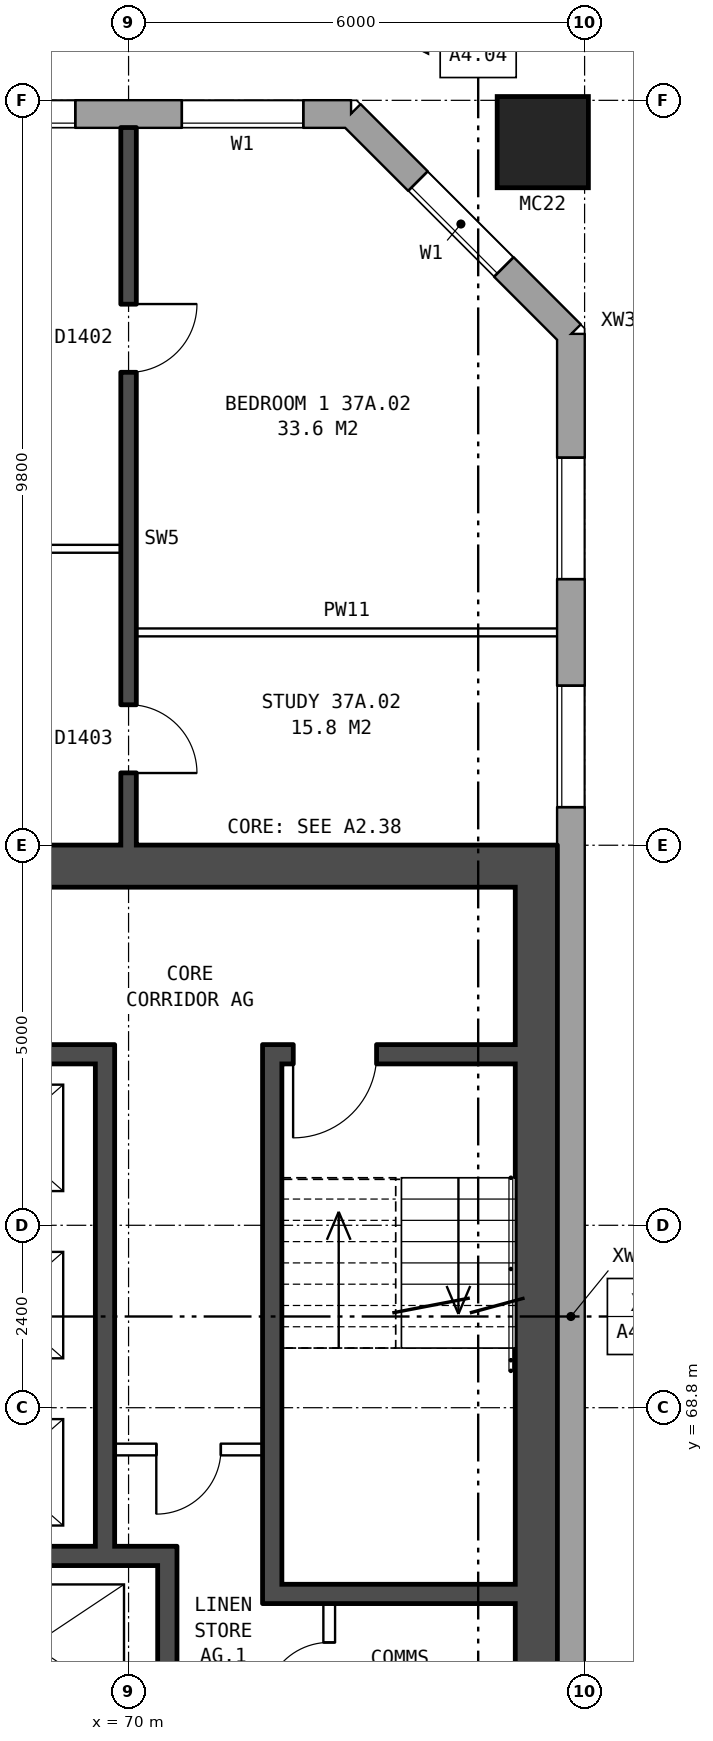
"""IFC4 building model, lengths in metres.
Left out: names, types, materials, properties, quantities, classifications, styles, units other than length and angle.
Written with IfcOpenShell. Run it as: python <this file> out.ifc"""

import sys

from ifc_helpers import new_model, si_unit, direction, frame, frame_2d, origin, origin_2d, place, context, subcontext, project, spatial, rectangle, hollow_rectangle, extrude, element, fill, save


model = new_model("IFC4")
c1 = context("Model", 3, precision=1e-05, world=origin(), true_north=direction((0.0, 1.0)))
c2 = subcontext(c1, "Body", "Model", "MODEL_VIEW")
j1 = project(units=[si_unit("LENGTHUNIT", "METRE"), si_unit("PLANEANGLEUNIT", "RADIAN")], contexts=[c1])
p1 = place(None, origin())
s1 = spatial("IfcSite", under=j1, at=p1, CompositionType="ELEMENT")
p2 = place(p1, origin())
s2 = spatial("IfcBuilding", under=s1, at=p2, CompositionType="ELEMENT")
p3 = place(p2, frame((0.0, 0.0, 133.0)))
s3 = spatial("IfcBuildingStorey", under=s2, at=p3, CompositionType="ELEMENT", Elevation=133.0)
p4 = place(p3, frame((75.45, 85.45, 0.0), z_axis=(0.0, 0.0, 1.0), x_axis=(1.0, 0.0, 0.0)))
e1 = element("IfcColumn", 1, at=p4, inside=s3, PredefinedType="COLUMN", context=c2, shape_type="SweptSolid", body=[
    extrude(hollow_rectangle(XDim=1.2, YDim=1.2, WallThickness=0.065, at=origin_2d()), origin(), (0.0, 0.0, 1.0), 3.1),
])
p5 = place(p3, frame((75.82, 57.075, 0.0), z_axis=(0.0, 0.0, 1.0), x_axis=(0.0, 1.0, 0.0)))
e2 = element("IfcWall", 2, at=p5, inside=s3, PredefinedType="STANDARD", context=c2, shape_type="SweptSolid", body=[
    extrude(rectangle(XDim=25.851, YDim=0.36, at=frame_2d((12.925, 0.0))), origin(), (0.0, 0.0, 1.0), 2.85),
])
p6 = place(p5, frame((1.625, 0.0, 0.8)))
e3 = element("IfcOpeningElement", 3, at=p6, cuts=e2, PredefinedType="OPENING", context=c2, shape_type="SweptSolid", body=[
    extrude(rectangle(XDim=1.6, YDim=1.8, at=frame_2d((0.8, 0.9))), frame((0.0, 0.19, 0.0), z_axis=(0.0, -1.0, 0.0), x_axis=(1.0, 0.0, 0.0)), (0.0, 0.0, 1.0), 0.38),
])
p7 = place(p5, frame((4.625, 0.0, 0.8)))
e4 = element("IfcOpeningElement", 4, at=p7, cuts=e2, PredefinedType="OPENING", context=c2, shape_type="SweptSolid", body=[
    extrude(rectangle(XDim=1.6, YDim=1.8, at=frame_2d((0.8, 0.9))), frame((0.0, 0.19, 0.0), z_axis=(0.0, -1.0, 0.0), x_axis=(1.0, 0.0, 0.0)), (0.0, 0.0, 1.0), 0.38),
])
p8 = place(p5, frame((19.625, 0.0, 0.8)))
e5 = element("IfcOpeningElement", 5, at=p8, cuts=e2, PredefinedType="OPENING", context=c2, shape_type="SweptSolid", body=[
    extrude(rectangle(XDim=1.6, YDim=1.8, at=frame_2d((0.8, 0.9))), frame((0.0, 0.19, 0.0), z_axis=(0.0, -1.0, 0.0), x_axis=(1.0, 0.0, 0.0)), (0.0, 0.0, 1.0), 0.38),
])
p9 = place(p5, frame((22.625, 0.0, 0.8)))
e6 = element("IfcOpeningElement", 6, at=p9, cuts=e2, PredefinedType="OPENING", context=c2, shape_type="SweptSolid", body=[
    extrude(rectangle(XDim=1.6, YDim=1.8, at=frame_2d((0.8, 0.9))), frame((0.0, 0.19, 0.0), z_axis=(0.0, -1.0, 0.0), x_axis=(1.0, 0.0, 0.0)), (0.0, 0.0, 1.0), 0.38),
])
p10 = place(p3, frame((75.82, 82.925, 0.0), z_axis=(0.0, 0.0, 1.0), x_axis=(-0.707106781187, 0.707106781187, 0.0)))
e7 = element("IfcWall", 7, at=p10, inside=s3, PredefinedType="STANDARD", context=c2, shape_type="SweptSolid", body=[
    extrude(rectangle(XDim=4.094, YDim=0.36, at=frame_2d((2.047, 0.0))), origin(), (0.0, 0.0, 1.0), 2.85),
])
p11 = place(p10, frame((1.247, 0.0, 0.8)))
e8 = element("IfcOpeningElement", 8, at=p11, cuts=e7, PredefinedType="OPENING", context=c2, shape_type="SweptSolid", body=[
    extrude(rectangle(XDim=1.6, YDim=1.8, at=frame_2d((0.8, 0.9))), frame((0.0, 0.19, 0.0), z_axis=(0.0, -1.0, 0.0), x_axis=(1.0, 0.0, 0.0)), (0.0, 0.0, 1.0), 0.38),
])
p12 = place(p3, frame((72.925, 85.82, 0.0), z_axis=(0.0, 0.0, 1.0), x_axis=(-1.0, 0.0, 0.0)))
e9 = element("IfcWall", 9, at=p12, inside=s3, PredefinedType="STANDARD", context=c2, shape_type="SweptSolid", body=[
    extrude(rectangle(XDim=43.101, YDim=0.36, at=frame_2d((21.55, 0.0))), origin(), (0.0, 0.0, 1.0), 2.85),
])
p13 = place(p12, frame((0.625, 0.0, 0.8)))
e10 = element("IfcOpeningElement", 10, at=p13, cuts=e9, PredefinedType="OPENING", context=c2, shape_type="SweptSolid", body=[
    extrude(rectangle(XDim=1.6, YDim=1.8, at=frame_2d((0.8, 0.9))), frame((0.0, 0.19, 0.0), z_axis=(0.0, -1.0, 0.0), x_axis=(1.0, 0.0, 0.0)), (0.0, 0.0, 1.0), 0.38),
])
p14 = place(p12, frame((3.625, 0.0, 0.8)))
e11 = element("IfcOpeningElement", 11, at=p14, cuts=e9, PredefinedType="OPENING", context=c2, shape_type="SweptSolid", body=[
    extrude(rectangle(XDim=1.6, YDim=1.8, at=frame_2d((0.8, 0.9))), frame((0.0, 0.19, 0.0), z_axis=(0.0, -1.0, 0.0), x_axis=(1.0, 0.0, 0.0)), (0.0, 0.0, 1.0), 0.38),
])
p15 = place(p12, frame((6.625, 0.0, 0.8)))
e12 = element("IfcOpeningElement", 12, at=p15, cuts=e9, PredefinedType="OPENING", context=c2, shape_type="SweptSolid", body=[
    extrude(rectangle(XDim=1.6, YDim=1.8, at=frame_2d((0.8, 0.9))), frame((0.0, 0.19, 0.0), z_axis=(0.0, -1.0, 0.0), x_axis=(1.0, 0.0, 0.0)), (0.0, 0.0, 1.0), 0.38),
])
p16 = place(p12, frame((9.625, 0.0, 0.8)))
e13 = element("IfcOpeningElement", 13, at=p16, cuts=e9, PredefinedType="OPENING", context=c2, shape_type="SweptSolid", body=[
    extrude(rectangle(XDim=1.6, YDim=1.8, at=frame_2d((0.8, 0.9))), frame((0.0, 0.19, 0.0), z_axis=(0.0, -1.0, 0.0), x_axis=(1.0, 0.0, 0.0)), (0.0, 0.0, 1.0), 0.38),
])
p17 = place(p12, frame((12.075, 0.0, 1.65)))
e14 = element("IfcOpeningElement", 14, at=p17, cuts=e9, PredefinedType="OPENING", context=c2, shape_type="SweptSolid", body=[
    extrude(rectangle(XDim=1.0, YDim=0.9, at=frame_2d((0.5, 0.45))), frame((0.0, 0.19, 0.0), z_axis=(0.0, -1.0, 0.0), x_axis=(1.0, 0.0, 0.0)), (0.0, 0.0, 1.0), 0.38),
])
p18 = place(p12, frame((15.625, 0.0, 0.8)))
e15 = element("IfcOpeningElement", 15, at=p18, cuts=e9, PredefinedType="OPENING", context=c2, shape_type="SweptSolid", body=[
    extrude(rectangle(XDim=1.6, YDim=1.8, at=frame_2d((0.8, 0.9))), frame((0.0, 0.19, 0.0), z_axis=(0.0, -1.0, 0.0), x_axis=(1.0, 0.0, 0.0)), (0.0, 0.0, 1.0), 0.38),
])
p19 = place(p12, frame((18.625, 0.0, 0.8)))
e16 = element("IfcOpeningElement", 16, at=p19, cuts=e9, PredefinedType="OPENING", context=c2, shape_type="SweptSolid", body=[
    extrude(rectangle(XDim=1.6, YDim=1.8, at=frame_2d((0.8, 0.9))), frame((0.0, 0.19, 0.0), z_axis=(0.0, -1.0, 0.0), x_axis=(1.0, 0.0, 0.0)), (0.0, 0.0, 1.0), 0.38),
])
p20 = place(p12, frame((21.625, 0.0, 0.8)))
e17 = element("IfcOpeningElement", 17, at=p20, cuts=e9, PredefinedType="OPENING", context=c2, shape_type="SweptSolid", body=[
    extrude(rectangle(XDim=1.6, YDim=1.8, at=frame_2d((0.8, 0.9))), frame((0.0, 0.19, 0.0), z_axis=(0.0, -1.0, 0.0), x_axis=(1.0, 0.0, 0.0)), (0.0, 0.0, 1.0), 0.38),
])
p21 = place(p12, frame((24.625, 0.0, 0.8)))
e18 = element("IfcOpeningElement", 18, at=p21, cuts=e9, PredefinedType="OPENING", context=c2, shape_type="SweptSolid", body=[
    extrude(rectangle(XDim=1.6, YDim=1.8, at=frame_2d((0.8, 0.9))), frame((0.0, 0.19, 0.0), z_axis=(0.0, -1.0, 0.0), x_axis=(1.0, 0.0, 0.0)), (0.0, 0.0, 1.0), 0.38),
])
p22 = place(p12, frame((27.125, 0.0, 0.8)))
e19 = element("IfcOpeningElement", 19, at=p22, cuts=e9, PredefinedType="OPENING", context=c2, shape_type="SweptSolid", body=[
    extrude(rectangle(XDim=0.6, YDim=1.8, at=frame_2d((0.3, 0.9))), frame((0.0, 0.19, 0.0), z_axis=(0.0, -1.0, 0.0), x_axis=(1.0, 0.0, 0.0)), (0.0, 0.0, 1.0), 0.38),
])
p23 = place(p12, frame((30.625, 0.0, 0.8)))
e20 = element("IfcOpeningElement", 20, at=p23, cuts=e9, PredefinedType="OPENING", context=c2, shape_type="SweptSolid", body=[
    extrude(rectangle(XDim=1.6, YDim=1.8, at=frame_2d((0.8, 0.9))), frame((0.0, 0.19, 0.0), z_axis=(0.0, -1.0, 0.0), x_axis=(1.0, 0.0, 0.0)), (0.0, 0.0, 1.0), 0.38),
])
p24 = place(p12, frame((33.625, 0.0, 0.8)))
e21 = element("IfcOpeningElement", 21, at=p24, cuts=e9, PredefinedType="OPENING", context=c2, shape_type="SweptSolid", body=[
    extrude(rectangle(XDim=1.6, YDim=1.8, at=frame_2d((0.8, 0.9))), frame((0.0, 0.19, 0.0), z_axis=(0.0, -1.0, 0.0), x_axis=(1.0, 0.0, 0.0)), (0.0, 0.0, 1.0), 0.38),
])
p25 = place(p12, frame((36.625, 0.0, 0.8)))
e22 = element("IfcOpeningElement", 22, at=p25, cuts=e9, PredefinedType="OPENING", context=c2, shape_type="SweptSolid", body=[
    extrude(rectangle(XDim=1.6, YDim=1.8, at=frame_2d((0.8, 0.9))), frame((0.0, 0.19, 0.0), z_axis=(0.0, -1.0, 0.0), x_axis=(1.0, 0.0, 0.0)), (0.0, 0.0, 1.0), 0.38),
])
p26 = place(p12, frame((39.625, 0.0, 0.8)))
e23 = element("IfcOpeningElement", 23, at=p26, cuts=e9, PredefinedType="OPENING", context=c2, shape_type="SweptSolid", body=[
    extrude(rectangle(XDim=1.6, YDim=1.8, at=frame_2d((0.8, 0.9))), frame((0.0, 0.19, 0.0), z_axis=(0.0, -1.0, 0.0), x_axis=(1.0, 0.0, 0.0)), (0.0, 0.0, 1.0), 0.38),
])
p27 = place(p12, frame((13.875, 0.0, 0.15)))
e24 = element("IfcOpeningElement", 24, at=p27, cuts=e9, PredefinedType="OPENING", context=c2, shape_type="SweptSolid", body=[
    extrude(rectangle(XDim=0.8, YDim=1.2, at=frame_2d((0.4, 0.6))), frame((0.0, 0.19, 0.0), z_axis=(0.0, -1.0, 0.0), x_axis=(1.0, 0.0, 0.0)), (0.0, 0.0, 1.0), 0.38),
])
p28 = place(p12, frame((28.025, 0.0, 0.8)))
e25 = element("IfcOpeningElement", 25, at=p28, cuts=e9, PredefinedType="OPENING", context=c2, shape_type="SweptSolid", body=[
    extrude(rectangle(XDim=0.8, YDim=0.9, at=frame_2d((0.4, 0.45))), frame((0.0, 0.19, 0.0), z_axis=(0.0, -1.0, 0.0), x_axis=(1.0, 0.0, 0.0)), (0.0, 0.0, 1.0), 0.38),
])
p29 = place(p3, frame((75.365, 63.8, 0.0), z_axis=(0.0, 0.0, 1.0), x_axis=(0.0, 1.0, 0.0)))
e26 = element("IfcWall", 26, at=p29, inside=s3, PredefinedType="SHEAR", context=c2, shape_type="SweptSolid", body=[
    extrude(rectangle(XDim=12.4, YDim=0.55, at=frame_2d((6.2, 0.0))), origin(), (0.0, 0.0, 1.0), 2.85),
])
p30 = place(p3, frame((67.19, 75.925, 0.0), z_axis=(0.0, 0.0, 1.0), x_axis=(1.0, 0.0, 0.0)))
e27 = element("IfcWall", 27, at=p30, inside=s3, PredefinedType="SHEAR", context=c2, shape_type="SweptSolid", body=[
    extrude(rectangle(XDim=7.9, YDim=0.55, at=frame_2d((3.95, 0.0))), origin(), (0.0, 0.0, 1.0), 2.85),
])
p31 = place(p3, frame((72.015, 66.35, 0.0), z_axis=(0.0, 0.0, 1.0), x_axis=(1.0, 0.0, 0.0)))
e28 = element("IfcWall", 28, at=p31, inside=s3, PredefinedType="SHEAR", context=c2, shape_type="SweptSolid", body=[
    extrude(rectangle(XDim=3.075, YDim=0.25, at=frame_2d((1.538, 0.0))), origin(), (0.0, 0.0, 1.0), 2.85),
])
p32 = place(p3, frame((67.19, 66.85, 0.0), z_axis=(0.0, 0.0, 1.0), x_axis=(1.0, 0.0, 0.0)))
e29 = element("IfcWall", 29, at=p32, inside=s3, PredefinedType="SHEAR", context=c2, shape_type="SweptSolid", body=[
    extrude(rectangle(XDim=3.445, YDim=0.25, at=frame_2d((1.723, 0.0))), origin(), (0.0, 0.0, 1.0), 2.85),
])
p33 = place(p3, frame((69.815, 68.25, 0.0), z_axis=(0.0, 0.0, 1.0), x_axis=(1.0, 0.0, 0.0)))
e30 = element("IfcWall", 30, at=p33, inside=s3, PredefinedType="PARTITIONING", context=c2, shape_type="SweptSolid", body=[
    extrude(rectangle(XDim=1.95, YDim=0.15, at=frame_2d((0.975, 0.0))), origin(), (0.0, 0.0, 1.0), 2.85),
])
p34 = place(p33, frame((0.55, 0.0, 0.0)))
e31 = element("IfcOpeningElement", 31, at=p34, cuts=e30, PredefinedType="OPENING", context=c2, shape_type="SweptSolid", body=[
    extrude(rectangle(XDim=0.85, YDim=2.1, at=frame_2d((0.425, 1.05))), frame((0.0, 0.085, 0.0), z_axis=(0.0, -1.0, 0.0), x_axis=(1.0, 0.0, 0.0)), (0.0, 0.0, 1.0), 0.17),
])
p35 = place(p3, frame((67.19, 73.45, 0.0), z_axis=(0.0, 0.0, 1.0), x_axis=(1.0, 0.0, 0.0)))
e32 = element("IfcWall", 32, at=p35, inside=s3, PredefinedType="SHEAR", context=c2, shape_type="SweptSolid", body=[
    extrude(rectangle(XDim=2.375, YDim=0.25, at=frame_2d((1.188, 0.0))), origin(), (0.0, 0.0, 1.0), 2.85),
])
p36 = place(p3, frame((72.015, 73.45, 0.0), z_axis=(0.0, 0.0, 1.0), x_axis=(1.0, 0.0, 0.0)))
e33 = element("IfcWall", 33, at=p36, inside=s3, PredefinedType="SHEAR", context=c2, shape_type="SweptSolid", body=[
    extrude(rectangle(XDim=3.075, YDim=0.25, at=frame_2d((1.538, 0.0))), origin(), (0.0, 0.0, 1.0), 2.85),
])
p37 = place(p36, frame((0.15, 0.0, 0.0)))
e34 = element("IfcOpeningElement", 34, at=p37, cuts=e33, PredefinedType="OPENING", context=c2, shape_type="SweptSolid", body=[
    extrude(rectangle(XDim=1.1, YDim=2.1, at=frame_2d((0.55, 1.05))), frame((0.0, 0.135, 0.0), z_axis=(0.0, -1.0, 0.0), x_axis=(1.0, 0.0, 0.0)), (0.0, 0.0, 1.0), 0.27),
])
p38 = place(p3, frame((69.69, 66.975, 0.0), z_axis=(0.0, 0.0, 1.0), x_axis=(0.0, 1.0, 0.0)))
e35 = element("IfcWall", 35, at=p38, inside=s3, PredefinedType="SHEAR", context=c2, shape_type="SweptSolid", body=[
    extrude(rectangle(XDim=6.6, YDim=0.25, at=frame_2d((3.3, 0.0))), origin(), (0.0, 0.0, 1.0), 2.85),
])
p39 = place(p3, frame((70.51, 64.35, 0.0), z_axis=(0.0, 0.0, 1.0), x_axis=(0.0, 1.0, 0.0)))
e36 = element("IfcWall", 36, at=p39, inside=s3, PredefinedType="SHEAR", context=c2, shape_type="SweptSolid", body=[
    extrude(rectangle(XDim=2.375, YDim=0.25, at=frame_2d((1.188, 0.0))), origin(), (0.0, 0.0, 1.0), 2.85),
])
p40 = place(p3, frame((71.89, 66.225, 0.0), z_axis=(0.0, 0.0, 1.0), x_axis=(0.0, 1.0, 0.0)))
e37 = element("IfcWall", 37, at=p40, inside=s3, PredefinedType="SHEAR", context=c2, shape_type="SweptSolid", body=[
    extrude(rectangle(XDim=7.35, YDim=0.25, at=frame_2d((3.675, 0.0))), origin(), (0.0, 0.0, 1.0), 2.85),
])
p41 = place(p3, frame((72.64, 64.35, 0.0), z_axis=(0.0, 0.0, 1.0), x_axis=(0.0, 1.0, 0.0)))
e38 = element("IfcWall", 38, at=p41, inside=s3, PredefinedType="PARTITIONING", context=c2, shape_type="SweptSolid", body=[
    extrude(rectangle(XDim=1.875, YDim=0.15, at=frame_2d((0.938, 0.0))), origin(), (0.0, 0.0, 1.0), 2.85),
])
p42 = place(p41, frame((0.512, 0.0, 0.0)))
e39 = element("IfcOpeningElement", 39, at=p42, cuts=e38, PredefinedType="OPENING", context=c2, shape_type="SweptSolid", body=[
    extrude(rectangle(XDim=0.85, YDim=2.1, at=frame_2d((0.425, 1.05))), frame((0.0, 0.085, 0.0), z_axis=(0.0, -1.0, 0.0), x_axis=(1.0, 0.0, 0.0)), (0.0, 0.0, 1.0), 0.17),
])
p43 = place(p3, frame((70.1, 79.0, 0.0), z_axis=(0.0, 0.0, 1.0), x_axis=(1.0, 0.0, 0.0)))
e40 = element("IfcWall", 40, at=p43, inside=s3, PredefinedType="PARTITIONING", context=c2, shape_type="SweptSolid", body=[
    extrude(rectangle(XDim=5.54, YDim=0.1, at=frame_2d((2.77, 0.0))), origin(), (0.0, 0.0, 1.0), 2.85),
])
p44 = place(p3, frame((64.1, 80.1, 0.0), z_axis=(0.0, 0.0, 1.0), x_axis=(1.0, 0.0, 0.0)))
e41 = element("IfcWall", 41, at=p44, inside=s3, PredefinedType="PARTITIONING", context=c2, shape_type="SweptSolid", body=[
    extrude(rectangle(XDim=5.8, YDim=0.1, at=frame_2d((2.9, 0.0))), origin(), (0.0, 0.0, 1.0), 2.85),
])
p45 = place(p44, frame((3.6, 0.0, 0.0)))
e42 = element("IfcOpeningElement", 42, at=p45, cuts=e41, PredefinedType="OPENING", context=c2, shape_type="SweptSolid", body=[
    extrude(rectangle(XDim=0.9, YDim=2.1, at=frame_2d((0.45, 1.05))), frame((0.0, 0.06, 0.0), z_axis=(0.0, -1.0, 0.0), x_axis=(1.0, 0.0, 0.0)), (0.0, 0.0, 1.0), 0.12),
])
p46 = place(p44, frame((0.7, 0.0, 0.0)))
e43 = element("IfcOpeningElement", 43, at=p46, cuts=e41, PredefinedType="OPENING", context=c2, shape_type="SweptSolid", body=[
    extrude(rectangle(XDim=0.9, YDim=2.1, at=frame_2d((0.45, 1.05))), frame((0.0, 0.06, 0.0), z_axis=(0.0, -1.0, 0.0), x_axis=(1.0, 0.0, 0.0)), (0.0, 0.0, 1.0), 0.12),
])
p47 = place(p3, frame((70.0, 76.2, 0.0), z_axis=(0.0, 0.0, 1.0), x_axis=(0.0, 1.0, 0.0)))
e44 = element("IfcWall", 44, at=p47, inside=s3, PredefinedType="SOLIDWALL", context=c2, shape_type="SweptSolid", body=[
    extrude(rectangle(XDim=9.44, YDim=0.2, at=frame_2d((4.72, 0.0))), origin(), (0.0, 0.0, 1.0), 2.85),
])
p48 = place(p47, frame((6.22, 0.0, 0.0)))
e45 = element("IfcOpeningElement", 45, at=p48, cuts=e44, PredefinedType="OPENING", context=c2, shape_type="SweptSolid", body=[
    extrude(rectangle(XDim=0.9, YDim=2.1, at=frame_2d((0.45, 1.05))), frame((0.0, 0.11, 0.0), z_axis=(0.0, -1.0, 0.0), x_axis=(1.0, 0.0, 0.0)), (0.0, 0.0, 1.0), 0.22),
])
p49 = place(p47, frame((0.95, 0.0, 0.0)))
e46 = element("IfcOpeningElement", 46, at=p49, cuts=e44, PredefinedType="OPENING", context=c2, shape_type="SweptSolid", body=[
    extrude(rectangle(XDim=0.9, YDim=2.1, at=frame_2d((0.45, 1.05))), frame((0.0, 0.11, 0.0), z_axis=(0.0, -1.0, 0.0), x_axis=(1.0, 0.0, 0.0)), (0.0, 0.0, 1.0), 0.22),
])
p50 = place(p8, origin())
e47 = element("IfcWindow", 47, at=p50, inside=s3, PartitioningType="SINGLE_PANEL", PredefinedType="WINDOW", context=c2, shape_type="SweptSolid", body=[
    extrude(rectangle(XDim=1.6, YDim=1.8, at=frame_2d((0.8, 0.9))), frame((0.0, 0.15, 0.0), z_axis=(0.0, -1.0, 0.0), x_axis=(1.0, 0.0, 0.0)), (0.0, 0.0, 1.0), 0.06),
])
fill(e5, e47)
p51 = place(p9, origin())
e48 = element("IfcWindow", 48, at=p51, inside=s3, PartitioningType="SINGLE_PANEL", PredefinedType="WINDOW", context=c2, shape_type="SweptSolid", body=[
    extrude(rectangle(XDim=1.6, YDim=1.8, at=frame_2d((0.8, 0.9))), frame((0.0, 0.15, 0.0), z_axis=(0.0, -1.0, 0.0), x_axis=(1.0, 0.0, 0.0)), (0.0, 0.0, 1.0), 0.06),
])
fill(e6, e48)
p52 = place(p11, origin())
e49 = element("IfcWindow", 49, at=p52, inside=s3, PartitioningType="SINGLE_PANEL", PredefinedType="WINDOW", context=c2, shape_type="SweptSolid", body=[
    extrude(rectangle(XDim=1.6, YDim=1.8, at=frame_2d((0.8, 0.9))), frame((0.0, 0.15, 0.0), z_axis=(0.0, -1.0, 0.0), x_axis=(1.0, 0.0, 0.0)), (0.0, 0.0, 1.0), 0.06),
])
fill(e8, e49)
p53 = place(p13, origin())
e50 = element("IfcWindow", 50, at=p53, inside=s3, PartitioningType="SINGLE_PANEL", PredefinedType="WINDOW", context=c2, shape_type="SweptSolid", body=[
    extrude(rectangle(XDim=1.6, YDim=1.8, at=frame_2d((0.8, 0.9))), frame((0.0, 0.15, 0.0), z_axis=(0.0, -1.0, 0.0), x_axis=(1.0, 0.0, 0.0)), (0.0, 0.0, 1.0), 0.06),
])
fill(e10, e50)
p54 = place(p14, origin())
e51 = element("IfcWindow", 51, at=p54, inside=s3, PartitioningType="SINGLE_PANEL", PredefinedType="WINDOW", context=c2, shape_type="SweptSolid", body=[
    extrude(rectangle(XDim=1.6, YDim=1.8, at=frame_2d((0.8, 0.9))), frame((0.0, 0.15, 0.0), z_axis=(0.0, -1.0, 0.0), x_axis=(1.0, 0.0, 0.0)), (0.0, 0.0, 1.0), 0.06),
])
fill(e11, e51)
p55 = place(p37, frame((1.1, 0.0, 0.0), z_axis=(0.0, 0.0, 1.0), x_axis=(-1.0, 0.0, 0.0)))
e52 = element("IfcDoor", 52, at=p55, inside=s3, OperationType="SINGLE_SWING_RIGHT", PredefinedType="DOOR", context=c2, shape_type="SweptSolid", body=[
    extrude(rectangle(XDim=1.1, YDim=2.1, at=frame_2d((0.55, 1.05))), frame((0.0, 0.025, 0.0), z_axis=(0.0, -1.0, 0.0), x_axis=(1.0, 0.0, 0.0)), (0.0, 0.0, 1.0), 0.05),
])
fill(e34, e52)
p56 = place(p34, frame((0.85, 0.0, 0.0), z_axis=(0.0, 0.0, 1.0), x_axis=(-1.0, 0.0, 0.0)))
e53 = element("IfcDoor", 53, at=p56, inside=s3, OperationType="SINGLE_SWING_RIGHT", PredefinedType="DOOR", context=c2, shape_type="SweptSolid", body=[
    extrude(rectangle(XDim=0.85, YDim=2.1, at=frame_2d((0.425, 1.05))), frame((0.0, 0.025, 0.0), z_axis=(0.0, -1.0, 0.0), x_axis=(1.0, 0.0, 0.0)), (0.0, 0.0, 1.0), 0.05),
])
fill(e31, e53)
p57 = place(p42, origin())
e54 = element("IfcDoor", 54, at=p57, inside=s3, OperationType="SINGLE_SWING_LEFT", PredefinedType="DOOR", context=c2, shape_type="SweptSolid", body=[
    extrude(rectangle(XDim=0.85, YDim=2.1, at=frame_2d((0.425, 1.05))), frame((0.0, 0.025, 0.0), z_axis=(0.0, -1.0, 0.0), x_axis=(1.0, 0.0, 0.0)), (0.0, 0.0, 1.0), 0.05),
])
fill(e39, e54)
p58 = place(p48, frame((0.9, 0.0, 0.0), z_axis=(0.0, 0.0, 1.0), x_axis=(-1.0, 0.0, 0.0)))
e55 = element("IfcDoor", 55, at=p58, inside=s3, OperationType="SINGLE_SWING_LEFT", PredefinedType="DOOR", context=c2, shape_type="SweptSolid", body=[
    extrude(rectangle(XDim=0.9, YDim=2.1, at=frame_2d((0.45, 1.05))), frame((0.0, 0.025, 0.0), z_axis=(0.0, -1.0, 0.0), x_axis=(1.0, 0.0, 0.0)), (0.0, 0.0, 1.0), 0.05),
])
fill(e45, e55)
p59 = place(p49, frame((0.9, 0.0, 0.0), z_axis=(0.0, 0.0, 1.0), x_axis=(-1.0, 0.0, 0.0)))
e56 = element("IfcDoor", 56, at=p59, inside=s3, OperationType="SINGLE_SWING_RIGHT", PredefinedType="DOOR", context=c2, shape_type="SweptSolid", body=[
    extrude(rectangle(XDim=0.9, YDim=2.1, at=frame_2d((0.45, 1.05))), frame((0.0, 0.025, 0.0), z_axis=(0.0, -1.0, 0.0), x_axis=(1.0, 0.0, 0.0)), (0.0, 0.0, 1.0), 0.05),
])
fill(e46, e56)
save(model, sys.argv[1])
